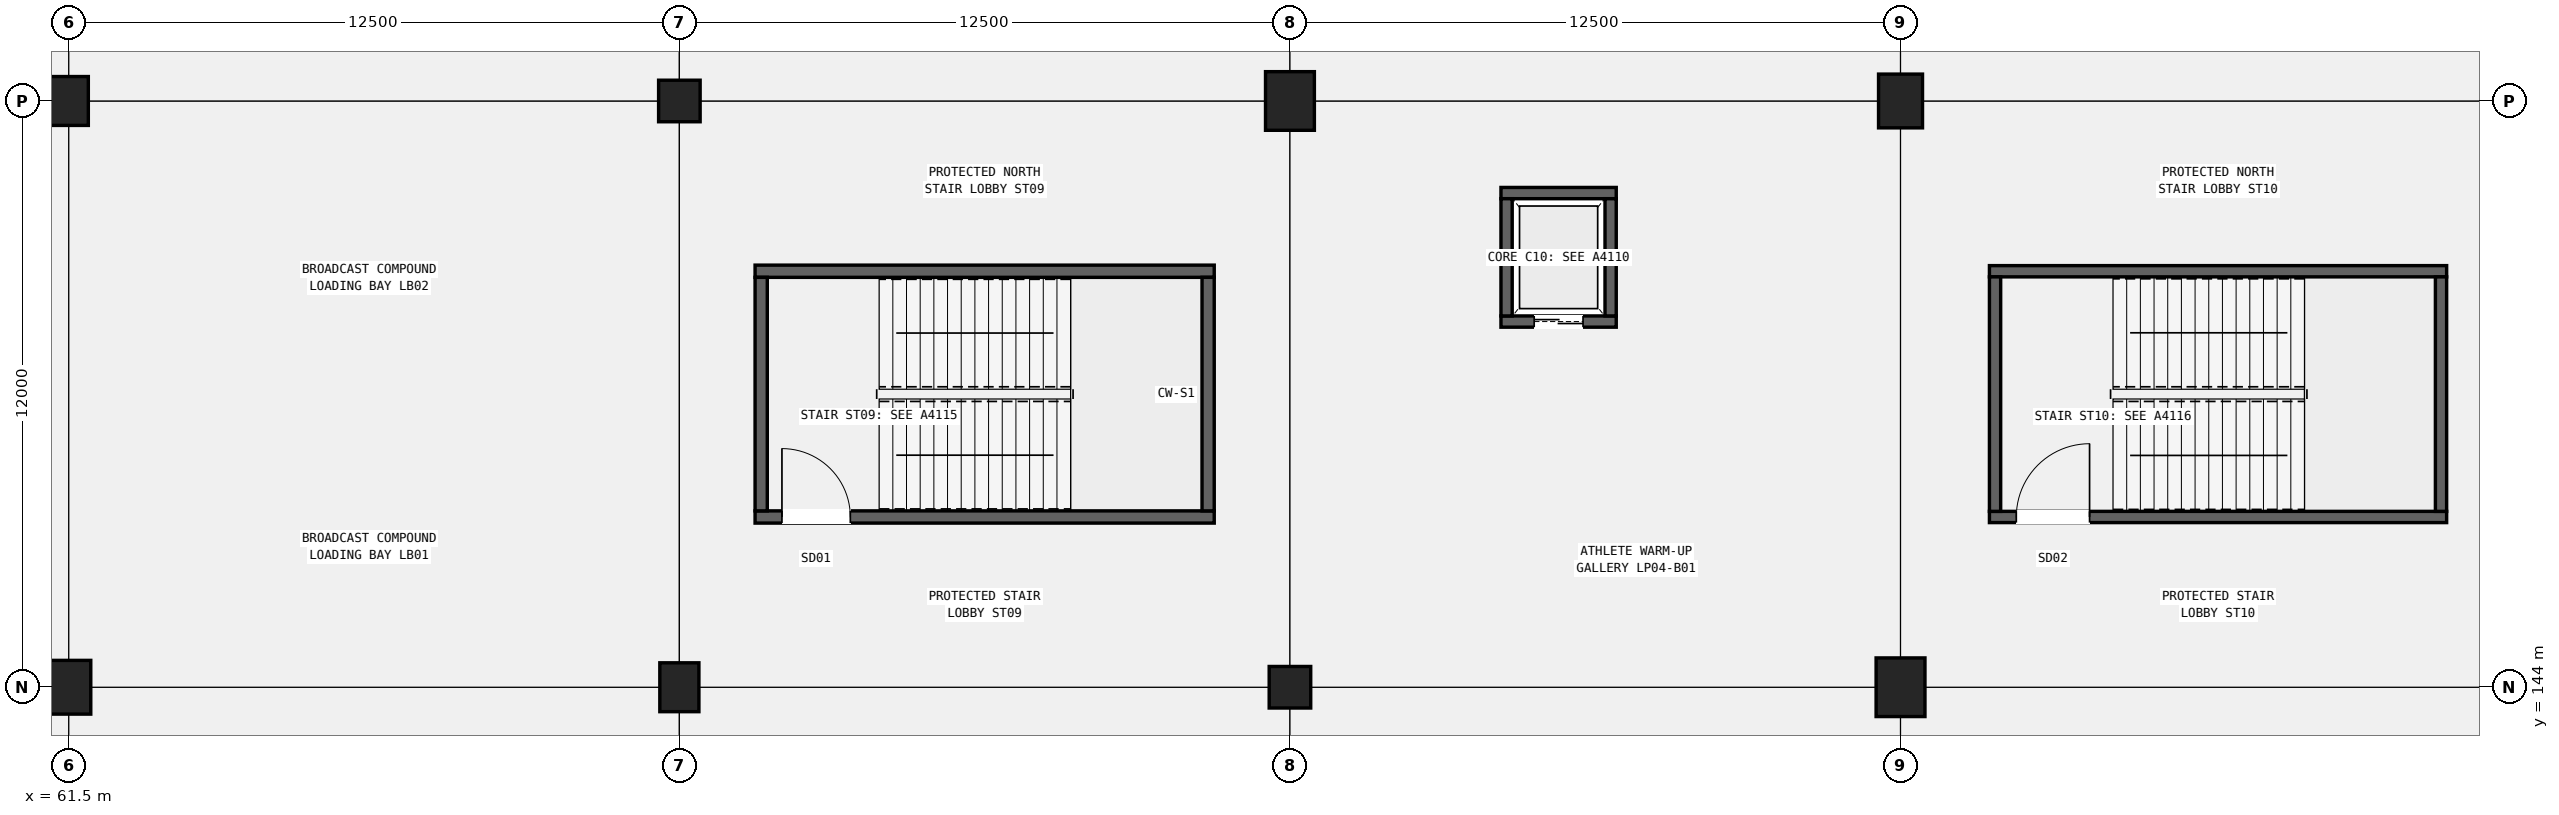
"""IFC4 building model, lengths in metres.
Left out: names, types, materials, properties, quantities, classifications, styles, units other than length and angle.
Written with IfcOpenShell. Run it as: python <this file> out.ifc"""

import sys

from ifc_helpers import new_model, si_unit, direction, frame, frame_2d, origin, origin_2d, place, context, subcontext, project, spatial, rectangle, circle, extrude, element, fill, save


model = new_model("IFC4")
c1 = context("Model", 3, precision=1e-05, world=origin(), true_north=direction((0.0, 1.0)))
c2 = subcontext(c1, "Body", "Model", "MODEL_VIEW")
j1 = project(units=[si_unit("LENGTHUNIT", "METRE"), si_unit("PLANEANGLEUNIT", "RADIAN")], contexts=[c1])
p1 = place(None, origin())
s1 = spatial("IfcSite", under=j1, at=p1, CompositionType="ELEMENT")
p2 = place(p1, origin())
s2 = spatial("IfcBuilding", under=s1, at=p2, CompositionType="ELEMENT")
p3 = place(p2, frame((0.0, 0.0, -4.8)))
s3 = spatial("IfcBuildingStorey", under=s2, at=p3, CompositionType="ELEMENT", Elevation=-4.8)
p4 = place(p3, frame((61.5, 144.0, 0.0), z_axis=(0.0, 0.0, 1.0), x_axis=(1.0, 0.0, 0.0)))
e1 = element("IfcColumn", 1, at=p4, inside=s3, PredefinedType="COLUMN", context=c2, shape_type="SweptSolid", body=[
    extrude(rectangle(XDim=0.9, YDim=1.1, at=origin_2d()), origin(), (0.0, 0.0, 1.0), 4.8),
])
for number, where, z_axis, x_axis in (
    (2, (61.5, 156.0, 0.0), (0.0, 0.0, 1.0), (1.0, 0.0, 0.0)),
    (3, (74.0, 144.0, 0.0), (0.0, 0.0, 1.0), (1.0, 0.0, 0.0)),
):
    element("IfcColumn", number, at=place(p3, frame(where, z_axis=z_axis, x_axis=x_axis)), inside=s3, PredefinedType="COLUMN", context=c2, shape_type="SweptSolid", body=[
        extrude(rectangle(XDim=0.8, YDim=1.0, at=origin_2d()), origin(), (0.0, 0.0, 1.0), 4.8),
    ])
for number, where, z_axis, x_axis in (
    (4, (74.0, 156.0, 0.0), (0.0, 0.0, 1.0), (1.0, 0.0, 0.0)),
    (5, (86.5, 144.0, 0.0), (0.0, 0.0, 1.0), (1.0, 0.0, 0.0)),
):
    element("IfcColumn", number, at=place(p3, frame(where, z_axis=z_axis, x_axis=x_axis)), inside=s3, PredefinedType="COLUMN", context=c2, shape_type="SweptSolid", body=[
        extrude(circle(Radius=0.425, at=origin_2d()), origin(), (0.0, 0.0, 1.0), 4.8),
    ])
for number, where, z_axis, x_axis in (
    (6, (86.5, 156.0, 0.0), (0.0, 0.0, 1.0), (1.0, 0.0, 0.0)),
    (7, (99.0, 144.0, 0.0), (0.0, 0.0, 1.0), (1.0, 0.0, 0.0)),
):
    element("IfcColumn", number, at=place(p3, frame(where, z_axis=z_axis, x_axis=x_axis)), inside=s3, PredefinedType="COLUMN", context=c2, shape_type="SweptSolid", body=[
        extrude(rectangle(XDim=1.0, YDim=1.2, at=origin_2d()), origin(), (0.0, 0.0, 1.0), 4.8),
    ])
p5 = place(p3, frame((99.0, 156.0, 0.0), z_axis=(0.0, 0.0, 1.0), x_axis=(1.0, 0.0, 0.0)))
e8 = element("IfcColumn", 8, at=p5, inside=s3, PredefinedType="COLUMN", context=c2, shape_type="SweptSolid", body=[
    extrude(rectangle(XDim=0.9, YDim=1.1, at=origin_2d()), origin(), (0.0, 0.0, 1.0), 4.8),
])
p6 = place(p3, frame((75.55, 147.485, 0.0), z_axis=(0.0, 0.0, 1.0), x_axis=(1.0, 0.0, 0.0)))
e9 = element("IfcWall", 9, at=p6, inside=s3, PredefinedType="SHEAR", context=c2, shape_type="SweptSolid", body=[
    extrude(rectangle(XDim=9.4, YDim=0.25, at=frame_2d((4.7, 0.0))), origin(), (0.0, 0.0, 1.0), 4.5),
])
p7 = place(p6, frame((0.55, 0.0, 0.0)))
e10 = element("IfcOpeningElement", 10, at=p7, cuts=e9, PredefinedType="OPENING", context=c2, shape_type="SweptSolid", body=[
    extrude(rectangle(XDim=1.4, YDim=2.15, at=frame_2d((0.7, 1.075))), frame((0.0, 0.135, 0.0), z_axis=(0.0, -1.0, 0.0), x_axis=(1.0, 0.0, 0.0)), (0.0, 0.0, 1.0), 0.27),
])
p8 = place(p3, frame((75.55, 152.515, 0.0), z_axis=(0.0, 0.0, 1.0), x_axis=(1.0, 0.0, 0.0)))
e11 = element("IfcWall", 11, at=p8, inside=s3, PredefinedType="SHEAR", context=c2, shape_type="SweptSolid", body=[
    extrude(rectangle(XDim=9.4, YDim=0.25, at=frame_2d((4.7, 0.0))), origin(), (0.0, 0.0, 1.0), 4.5),
])
for number, where, z_axis, x_axis in (
    (12, (75.675, 147.61, 0.0), (0.0, 0.0, 1.0), (0.0, 1.0, 0.0)),
    (13, (84.825, 147.61, 0.0), (0.0, 0.0, 1.0), (0.0, 1.0, 0.0)),
):
    element("IfcWall", number, at=place(p3, frame(where, z_axis=z_axis, x_axis=x_axis)), inside=s3, PredefinedType="SHEAR", context=c2, shape_type="SweptSolid", body=[
        extrude(rectangle(XDim=4.78, YDim=0.25, at=frame_2d((2.39, 0.0))), origin(), (0.0, 0.0, 1.0), 4.5),
    ])
p9 = place(p3, frame((100.82, 147.485, 0.0), z_axis=(0.0, 0.0, 1.0), x_axis=(1.0, 0.0, 0.0)))
e14 = element("IfcWall", 14, at=p9, inside=s3, PredefinedType="SHEAR", context=c2, shape_type="SweptSolid", body=[
    extrude(rectangle(XDim=9.36, YDim=0.23, at=frame_2d((4.68, 0.0))), origin(), (0.0, 0.0, 1.0), 4.5),
])
p10 = place(p9, frame((0.55, 0.0, 0.0)))
e15 = element("IfcOpeningElement", 15, at=p10, cuts=e14, PredefinedType="OPENING", context=c2, shape_type="SweptSolid", body=[
    extrude(rectangle(XDim=1.5, YDim=2.2, at=frame_2d((0.75, 1.1))), frame((0.0, 0.125, 0.0), z_axis=(0.0, -1.0, 0.0), x_axis=(1.0, 0.0, 0.0)), (0.0, 0.0, 1.0), 0.25),
])
p11 = place(p3, frame((100.82, 152.515, 0.0), z_axis=(0.0, 0.0, 1.0), x_axis=(1.0, 0.0, 0.0)))
e16 = element("IfcWall", 16, at=p11, inside=s3, PredefinedType="SHEAR", context=c2, shape_type="SweptSolid", body=[
    extrude(rectangle(XDim=9.36, YDim=0.23, at=frame_2d((4.68, 0.0))), origin(), (0.0, 0.0, 1.0), 4.5),
])
for number, where, z_axis, x_axis in (
    (17, (100.935, 147.6, 0.0), (0.0, 0.0, 1.0), (0.0, 1.0, 0.0)),
    (18, (110.065, 147.6, 0.0), (0.0, 0.0, 1.0), (0.0, 1.0, 0.0)),
):
    element("IfcWall", number, at=place(p3, frame(where, z_axis=z_axis, x_axis=x_axis)), inside=s3, PredefinedType="SHEAR", context=c2, shape_type="SweptSolid", body=[
        extrude(rectangle(XDim=4.8, YDim=0.23, at=frame_2d((2.4, 0.0))), origin(), (0.0, 0.0, 1.0), 4.5),
    ])
p12 = place(p3, frame((90.82, 151.485, -0.65), z_axis=(0.0, 0.0, 1.0), x_axis=(1.0, 0.0, 0.0)))
e19 = element("IfcWall", 19, at=p12, inside=s3, PredefinedType="SHEAR", context=c2, shape_type="SweptSolid", body=[
    extrude(rectangle(XDim=2.36, YDim=0.23, at=frame_2d((1.18, 0.0))), origin(), (0.0, 0.0, 1.0), 4.5),
])
p13 = place(p12, frame((0.68, 0.0, 0.65)))
e20 = element("IfcOpeningElement", 20, at=p13, cuts=e19, PredefinedType="OPENING", context=c2, shape_type="SweptSolid", body=[
    extrude(rectangle(XDim=1.0, YDim=2.15, at=frame_2d((0.5, 1.075))), frame((0.0, 0.125, 0.0), z_axis=(0.0, -1.0, 0.0), x_axis=(1.0, 0.0, 0.0)), (0.0, 0.0, 1.0), 0.25),
])
p14 = place(p3, frame((90.82, 154.115, -0.65), z_axis=(0.0, 0.0, 1.0), x_axis=(1.0, 0.0, 0.0)))
e21 = element("IfcWall", 21, at=p14, inside=s3, PredefinedType="SHEAR", context=c2, shape_type="SweptSolid", body=[
    extrude(rectangle(XDim=2.36, YDim=0.23, at=frame_2d((1.18, 0.0))), origin(), (0.0, 0.0, 1.0), 4.5),
])
for number, where, z_axis, x_axis in (
    (22, (90.935, 151.6, -0.65), (0.0, 0.0, 1.0), (0.0, 1.0, 0.0)),
    (23, (93.065, 151.6, -0.65), (0.0, 0.0, 1.0), (0.0, 1.0, 0.0)),
):
    element("IfcWall", number, at=place(p3, frame(where, z_axis=z_axis, x_axis=x_axis)), inside=s3, PredefinedType="SHEAR", context=c2, shape_type="SweptSolid", body=[
        extrude(rectangle(XDim=2.4, YDim=0.23, at=frame_2d((1.2, 0.0))), origin(), (0.0, 0.0, 1.0), 4.5),
    ])
p15 = place(p7, origin())
e24 = element("IfcDoor", 24, at=p15, inside=s3, OperationType="SINGLE_SWING_LEFT", PredefinedType="DOOR", context=c2, shape_type="SweptSolid", body=[
    extrude(rectangle(XDim=1.4, YDim=2.15, at=frame_2d((0.7, 1.075))), frame((0.0, 0.025, 0.0), z_axis=(0.0, -1.0, 0.0), x_axis=(1.0, 0.0, 0.0)), (0.0, 0.0, 1.0), 0.05),
])
fill(e10, e24)
p16 = place(p10, origin())
e25 = element("IfcDoor", 25, at=p16, inside=s3, OperationType="SINGLE_SWING_RIGHT", PredefinedType="DOOR", context=c2, shape_type="SweptSolid", body=[
    extrude(rectangle(XDim=1.5, YDim=2.2, at=frame_2d((0.75, 1.1))), frame((0.0, 0.025, 0.0), z_axis=(0.0, -1.0, 0.0), x_axis=(1.0, 0.0, 0.0)), (0.0, 0.0, 1.0), 0.05),
])
fill(e15, e25)
p17 = place(p13, origin())
e26 = element("IfcDoor", 26, at=p17, inside=s3, OperationType="DOUBLE_DOOR_SLIDING", PredefinedType="DOOR", context=c2, shape_type="SweptSolid", body=[
    extrude(rectangle(XDim=1.0, YDim=2.15, at=frame_2d((0.5, 1.075))), frame((0.0, 0.025, 0.0), z_axis=(0.0, -1.0, 0.0), x_axis=(1.0, 0.0, 0.0)), (0.0, 0.0, 1.0), 0.05),
])
fill(e20, e26)
save(model, sys.argv[1])
